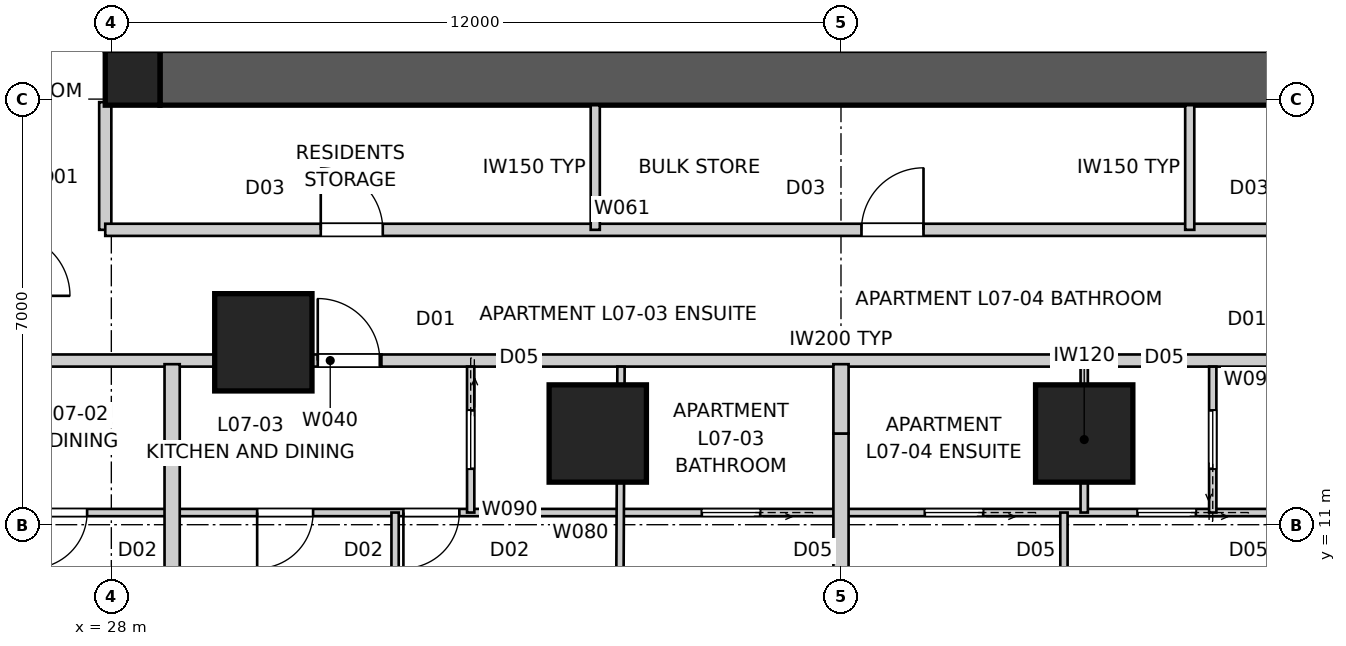
"""IFC4 building model, lengths in metres.
Left out: names, types, materials, properties, quantities, classifications, styles, units other than length and angle.
Written with IfcOpenShell. Run it as: python <this file> out.ifc"""

import sys

from ifc_helpers import new_model, si_unit, direction, frame, frame_2d, origin, origin_2d, place, context, subcontext, project, spatial, polyline, rectangle, outline, extrude, element, fill, save


model = new_model("IFC4")
c1 = context("Model", 3, precision=1e-05, world=origin(), true_north=direction((0.0, 1.0)))
c2 = subcontext(c1, "Body", "Model", "MODEL_VIEW")
j1 = project(units=[si_unit("LENGTHUNIT", "METRE"), si_unit("PLANEANGLEUNIT", "RADIAN")], contexts=[c1])
p1 = place(None, origin())
s1 = spatial("IfcSite", under=j1, at=p1, CompositionType="ELEMENT")
p2 = place(p1, origin())
s2 = spatial("IfcBuilding", under=s1, at=p2, CompositionType="ELEMENT")
p3 = place(p2, frame((0.0, 0.0, 28.6)))
s3 = spatial("IfcBuildingStorey", under=s2, at=p3, CompositionType="ELEMENT", Elevation=28.6)
p4 = place(p3, frame((51.2, 18.35, 0.0), z_axis=(0.0, 0.0, 1.0), x_axis=(-1.0, 0.0, 0.0)))
e1 = element("IfcWall", 1, at=p4, inside=s3, PredefinedType="SHEAR", context=c2, shape_type="SweptSolid", body=[
    extrude(outline(polyline([(0.0, -0.45), (22.4, -0.45), (22.4, -0.025), (22.85, -0.025), (22.85, 0.025), (22.4, 0.025), (22.4, 0.45), (0.0, 0.45), (0.0, 0.025), (-0.45, 0.025), (-0.45, -0.025), (0.0, -0.025), (0.0, -0.45)])), origin(), (0.0, 0.0, 1.0), 3.4),
])
p5 = place(p3, frame((28.35, 41.2, 0.0), z_axis=(0.0, 0.0, 1.0), x_axis=(0.0, -1.0, 0.0)))
e2 = element("IfcWall", 2, at=p5, inside=s3, PredefinedType="SHEAR", context=c2, shape_type="SweptSolid", body=[
    extrude(outline(polyline([(0.0, -0.45), (22.4, -0.45), (22.4, -0.025), (22.85, -0.025), (22.85, 0.025), (22.4, 0.025), (22.4, 0.45), (0.0, 0.45), (0.0, 0.025), (-0.45, 0.025), (-0.45, -0.025), (0.0, -0.025), (0.0, -0.45)])), origin(), (0.0, 0.0, 1.0), 3.4),
])
p6 = place(p5, frame((11.14, 0.0, 0.0)))
e3 = element("IfcOpeningElement", 3, at=p6, cuts=e2, PredefinedType="OPENING", context=c2, shape_type="SweptSolid", body=[
    extrude(rectangle(XDim=1.02, YDim=2.4, at=frame_2d((0.51, 1.2))), frame((0.0, 0.46, 0.0), z_axis=(0.0, -1.0, 0.0), x_axis=(1.0, 0.0, 0.0)), (0.0, 0.0, 1.0), 0.92),
])
p7 = place(p3, frame((28.35, 18.35, 0.0), z_axis=(0.0, 0.0, 1.0), x_axis=(1.0, 0.0, 0.0)))
e4 = element("IfcColumn", 4, at=p7, inside=s3, PredefinedType="COLUMN", context=c2, shape_type="SweptSolid", body=[
    extrude(rectangle(XDim=0.9, YDim=0.9, at=origin_2d()), origin(), (0.0, 0.0, 1.0), 3.4),
])
for number, where, z_axis, x_axis in (
    (5, (30.5, 14.0, 0.0), (0.0, 0.0, 1.0), (1.0, 0.0, 0.0)),
    (6, (36.0, 12.5, 0.0), (0.0, 0.0, 1.0), (1.0, 0.0, 0.0)),
    (7, (44.0, 12.5, 0.0), (0.0, 0.0, 1.0), (1.0, 0.0, 0.0)),
):
    element("IfcColumn", number, at=place(p3, frame(where, z_axis=z_axis, x_axis=x_axis)), inside=s3, PredefinedType="COLUMN", context=c2, shape_type="SweptSolid", body=[
        extrude(rectangle(XDim=1.6, YDim=1.6, at=origin_2d()), origin(), (0.0, 0.0, 1.0), 3.4),
    ])
p8 = place(p3, frame((26.3, 13.7, 0.0), z_axis=(0.0, 0.0, 1.0), x_axis=(1.0, 0.0, 0.0)))
e8 = element("IfcWall", 8, at=p8, inside=s3, PredefinedType="PARTITIONING", context=c2, shape_type="SweptSolid", body=[
    extrude(rectangle(XDim=4.458, YDim=0.2, at=frame_2d((2.229, 0.0))), origin(), (0.0, 0.0, 1.0), 3.25),
])
p9 = place(p3, frame((30.758, 13.7, 0.0), z_axis=(0.0, 0.0, 1.0), x_axis=(1.0, 0.0, 0.0)))
e9 = element("IfcWall", 9, at=p9, inside=s3, PredefinedType="PARTITIONING", context=c2, shape_type="SweptSolid", body=[
    extrude(rectangle(XDim=1.683, YDim=0.2, at=frame_2d((0.842, 0.0))), origin(), (0.0, 0.0, 1.0), 2.55),
])
p10 = place(p9, frame((0.637, 0.0, 0.0)))
e10 = element("IfcOpeningElement", 10, at=p10, cuts=e9, PredefinedType="OPENING", context=c2, shape_type="SweptSolid", body=[
    extrude(rectangle(XDim=1.02, YDim=2.34, at=frame_2d((0.51, 1.17))), frame((0.0, 0.11, 0.0), z_axis=(0.0, -1.0, 0.0), x_axis=(1.0, 0.0, 0.0)), (0.0, 0.0, 1.0), 0.22),
])
p11 = place(p3, frame((32.442, 13.7, 0.0), z_axis=(0.0, 0.0, 1.0), x_axis=(1.0, 0.0, 0.0)))
e11 = element("IfcWall", 11, at=p11, inside=s3, PredefinedType="PARTITIONING", context=c2, shape_type="SweptSolid", body=[
    extrude(rectangle(XDim=15.117, YDim=0.2, at=frame_2d((7.558, 0.0))), origin(), (0.0, 0.0, 1.0), 3.25),
])
p12 = place(p3, frame((29.0, 4.0, 0.0), z_axis=(0.0, 0.0, 1.0), x_axis=(0.0, 1.0, 0.0)))
e12 = element("IfcWall", 12, at=p12, inside=s3, PredefinedType="PARTITIONING", context=c2, shape_type="SweptSolid", body=[
    extrude(rectangle(XDim=9.64, YDim=0.25, at=frame_2d((4.82, 0.0))), origin(), (0.0, 0.0, 1.0), 3.25),
])
p13 = place(p3, frame((40.0, 4.0, 0.0), z_axis=(0.0, 0.0, 1.0), x_axis=(0.0, 1.0, 0.0)))
e13 = element("IfcWall", 13, at=p13, inside=s3, PredefinedType="PARTITIONING", context=c2, shape_type="SweptSolid", body=[
    extrude(rectangle(XDim=8.5, YDim=0.25, at=frame_2d((4.25, 0.0))), origin(), (0.0, 0.0, 1.0), 3.25),
])
p14 = place(p3, frame((40.0, 12.5, 0.0), z_axis=(0.0, 0.0, 1.0), x_axis=(0.0, 1.0, 0.0)))
e14 = element("IfcWall", 14, at=p14, inside=s3, PredefinedType="PARTITIONING", context=c2, shape_type="SweptSolid", body=[
    extrude(rectangle(XDim=1.14, YDim=0.25, at=frame_2d((0.57, 0.0))), origin(), (0.0, 0.0, 1.0), 2.796),
])
p15 = place(p3, frame((27.9, 17.95, 0.0), z_axis=(0.0, 0.0, 1.0), x_axis=(0.0, -1.0, 0.0)))
e15 = element("IfcWall", 15, at=p15, inside=s3, PredefinedType="PARTITIONING", context=c2, shape_type="SweptSolid", body=[
    extrude(rectangle(XDim=2.1, YDim=0.2, at=frame_2d((1.05, 0.0))), origin(), (0.0, 0.0, 1.0), 3.25),
])
p16 = place(p3, frame((27.9, 15.85, 0.0), z_axis=(0.0, 0.0, 1.0), x_axis=(1.0, 0.0, 0.0)))
e16 = element("IfcWall", 16, at=p16, inside=s3, PredefinedType="PARTITIONING", context=c2, shape_type="SweptSolid", body=[
    extrude(rectangle(XDim=24.2, YDim=0.2, at=frame_2d((12.1, 0.0))), origin(), (0.0, 0.0, 1.0), 3.25),
])
p17 = place(p16, frame((12.437, 0.0, 0.0)))
e17 = element("IfcOpeningElement", 17, at=p17, cuts=e16, PredefinedType="OPENING", context=c2, shape_type="SweptSolid", body=[
    extrude(rectangle(XDim=1.02, YDim=2.1, at=frame_2d((0.51, 1.05))), frame((0.0, 0.11, 0.0), z_axis=(0.0, -1.0, 0.0), x_axis=(1.0, 0.0, 0.0)), (0.0, 0.0, 1.0), 0.22),
])
p18 = place(p16, frame((3.544, 0.0, 0.0)))
e18 = element("IfcOpeningElement", 18, at=p18, cuts=e16, PredefinedType="OPENING", context=c2, shape_type="SweptSolid", body=[
    extrude(rectangle(XDim=1.02, YDim=2.1, at=frame_2d((0.51, 1.05))), frame((0.0, 0.11, 0.0), z_axis=(0.0, -1.0, 0.0), x_axis=(1.0, 0.0, 0.0)), (0.0, 0.0, 1.0), 0.22),
])
p19 = place(p16, frame((19.733, 0.0, 0.0)))
e19 = element("IfcOpeningElement", 19, at=p19, cuts=e16, PredefinedType="OPENING", context=c2, shape_type="SweptSolid", body=[
    extrude(rectangle(XDim=1.02, YDim=2.1, at=frame_2d((0.51, 1.05))), frame((0.0, 0.11, 0.0), z_axis=(0.0, -1.0, 0.0), x_axis=(1.0, 0.0, 0.0)), (0.0, 0.0, 1.0), 0.22),
])
p20 = place(p3, frame((35.958, 15.85, 0.0), z_axis=(0.0, 0.0, 1.0), x_axis=(0.0, 1.0, 0.0)))
e20 = element("IfcWall", 20, at=p20, inside=s3, PredefinedType="SOLIDWALL", context=c2, shape_type="SweptSolid", body=[
    extrude(rectangle(XDim=2.05, YDim=0.15, at=frame_2d((1.025, 0.0))), origin(), (0.0, 0.0, 1.0), 3.25),
])
p21 = place(p3, frame((45.735, 15.85, 0.0), z_axis=(0.0, 0.0, 1.0), x_axis=(0.0, 1.0, 0.0)))
e21 = element("IfcWall", 21, at=p21, inside=s3, PredefinedType="SOLIDWALL", context=c2, shape_type="SweptSolid", body=[
    extrude(rectangle(XDim=2.05, YDim=0.15, at=frame_2d((1.025, 0.0))), origin(), (0.0, 0.0, 1.0), 2.796),
])
p22 = place(p3, frame((56.2, 11.2, 0.0), z_axis=(0.0, 0.0, 1.0), x_axis=(-1.0, 0.0, 0.0)))
e22 = element("IfcWall", 22, at=p22, inside=s3, PredefinedType="PARTITIONING", context=c2, shape_type="SweptSolid", body=[
    extrude(rectangle(XDim=32.4, YDim=0.12, at=frame_2d((16.2, 0.0))), origin(), (0.0, 0.0, 1.0), 3.25),
])
p23 = place(p22, frame((24.882, 0.0, 0.0)))
e23 = element("IfcOpeningElement", 23, at=p23, cuts=e22, PredefinedType="OPENING", context=c2, shape_type="SweptSolid", body=[
    extrude(rectangle(XDim=0.92, YDim=2.34, at=frame_2d((0.46, 1.17))), frame((0.0, 0.07, 0.0), z_axis=(0.0, -1.0, 0.0), x_axis=(1.0, 0.0, 0.0)), (0.0, 0.0, 1.0), 0.14),
])
p24 = place(p22, frame((22.477, 0.0, 0.0)))
e24 = element("IfcOpeningElement", 24, at=p24, cuts=e22, PredefinedType="OPENING", context=c2, shape_type="SweptSolid", body=[
    extrude(rectangle(XDim=0.92, YDim=2.34, at=frame_2d((0.46, 1.17))), frame((0.0, 0.07, 0.0), z_axis=(0.0, -1.0, 0.0), x_axis=(1.0, 0.0, 0.0)), (0.0, 0.0, 1.0), 0.14),
])
p25 = place(p22, frame((6.598, 0.0, 0.0)))
e25 = element("IfcOpeningElement", 25, at=p25, cuts=e22, PredefinedType="OPENING", context=c2, shape_type="SweptSolid", body=[
    extrude(rectangle(XDim=0.92, YDim=2.34, at=frame_2d((0.46, 1.17))), frame((0.0, 0.07, 0.0), z_axis=(0.0, -1.0, 0.0), x_axis=(1.0, 0.0, 0.0)), (0.0, 0.0, 1.0), 0.14),
])
p26 = place(p22, frame((28.598, 0.0, 0.0)))
e26 = element("IfcOpeningElement", 26, at=p26, cuts=e22, PredefinedType="OPENING", context=c2, shape_type="SweptSolid", body=[
    extrude(rectangle(XDim=0.92, YDim=2.34, at=frame_2d((0.46, 1.17))), frame((0.0, 0.07, 0.0), z_axis=(0.0, -1.0, 0.0), x_axis=(1.0, 0.0, 0.0)), (0.0, 0.0, 1.0), 0.14),
])
p27 = place(p22, frame((2.862, 0.0, 0.0)))
e27 = element("IfcOpeningElement", 27, at=p27, cuts=e22, PredefinedType="OPENING", context=c2, shape_type="SweptSolid", body=[
    extrude(rectangle(XDim=0.96, YDim=2.1, at=frame_2d((0.48, 1.05))), frame((0.0, 0.07, 0.0), z_axis=(0.0, -1.0, 0.0), x_axis=(1.0, 0.0, 0.0)), (0.0, 0.0, 1.0), 0.14),
])
p28 = place(p22, frame((10.363, 0.0, 0.0)))
e28 = element("IfcOpeningElement", 28, at=p28, cuts=e22, PredefinedType="OPENING", context=c2, shape_type="SweptSolid", body=[
    extrude(rectangle(XDim=0.96, YDim=2.1, at=frame_2d((0.48, 1.05))), frame((0.0, 0.07, 0.0), z_axis=(0.0, -1.0, 0.0), x_axis=(1.0, 0.0, 0.0)), (0.0, 0.0, 1.0), 0.14),
])
p29 = place(p22, frame((13.862, 0.0, 0.0)))
e29 = element("IfcOpeningElement", 29, at=p29, cuts=e22, PredefinedType="OPENING", context=c2, shape_type="SweptSolid", body=[
    extrude(rectangle(XDim=0.96, YDim=2.1, at=frame_2d((0.48, 1.05))), frame((0.0, 0.07, 0.0), z_axis=(0.0, -1.0, 0.0), x_axis=(1.0, 0.0, 0.0)), (0.0, 0.0, 1.0), 0.14),
])
p30 = place(p22, frame((17.529, 0.0, 0.0)))
e30 = element("IfcOpeningElement", 30, at=p30, cuts=e22, PredefinedType="OPENING", context=c2, shape_type="SweptSolid", body=[
    extrude(rectangle(XDim=0.96, YDim=2.1, at=frame_2d((0.48, 1.05))), frame((0.0, 0.07, 0.0), z_axis=(0.0, -1.0, 0.0), x_axis=(1.0, 0.0, 0.0)), (0.0, 0.0, 1.0), 0.14),
])
p31 = place(p3, frame((33.91, 13.6, 0.0), z_axis=(0.0, 0.0, 1.0), x_axis=(0.0, -1.0, 0.0)))
e31 = element("IfcWall", 31, at=p31, inside=s3, PredefinedType="PARTITIONING", context=c2, shape_type="SweptSolid", body=[
    extrude(rectangle(XDim=2.4, YDim=0.12, at=frame_2d((1.2, 0.0))), origin(), (0.0, 0.0, 1.0), 3.25),
])
p32 = place(p31, frame((0.72, 0.0, 0.0)))
e32 = element("IfcOpeningElement", 32, at=p32, cuts=e31, PredefinedType="OPENING", context=c2, shape_type="SweptSolid", body=[
    extrude(rectangle(XDim=0.96, YDim=2.1, at=frame_2d((0.48, 1.05))), frame((0.0, 0.07, 0.0), z_axis=(0.0, -1.0, 0.0), x_axis=(1.0, 0.0, 0.0)), (0.0, 0.0, 1.0), 0.14),
])
p33 = place(p3, frame((36.333, 4.04, 0.0), z_axis=(0.0, 0.0, 1.0), x_axis=(0.005107446534, 0.99998695691, 0.0)))
e33 = element("IfcWall", 33, at=p33, inside=s3, PredefinedType="PARTITIONING", context=c2, shape_type="SweptSolid", body=[
    extrude(rectangle(XDim=9.56, YDim=0.12, at=frame_2d((4.78, 0.0))), origin(), (0.0, 0.0, 1.0), 3.25),
])
p34 = place(p33, frame((3.1, 0.0, 0.0)))
e34 = element("IfcOpeningElement", 34, at=p34, cuts=e33, PredefinedType="OPENING", context=c2, shape_type="SweptSolid", body=[
    extrude(rectangle(XDim=0.92, YDim=2.34, at=frame_2d((0.46, 1.17))), frame((0.0, 0.07, 0.0), z_axis=(0.0, -1.0, 0.0), x_axis=(1.0, 0.0, 0.0)), (0.0, 0.0, 1.0), 0.14),
])
p35 = place(p3, frame((32.667, 11.2, 0.0), z_axis=(0.0, 0.0, 1.0), x_axis=(0.0, -1.0, 0.0)))
e35 = element("IfcWall", 35, at=p35, inside=s3, PredefinedType="PARTITIONING", context=c2, shape_type="SweptSolid", body=[
    extrude(rectangle(XDim=7.16, YDim=0.12, at=frame_2d((3.58, 0.0))), origin(), (0.0, 0.0, 1.0), 3.25),
])
p36 = place(p3, frame((46.114, 11.2, 0.0), z_axis=(0.0, 0.0, 1.0), x_axis=(0.0, 1.0, 0.0)))
e36 = element("IfcWall", 36, at=p36, inside=s3, PredefinedType="PARTITIONING", context=c2, shape_type="SweptSolid", body=[
    extrude(rectangle(XDim=2.4, YDim=0.12, at=frame_2d((1.2, 0.0))), origin(), (0.0, 0.0, 1.0), 3.25),
])
p37 = place(p36, frame((0.72, 0.0, 0.0)))
e37 = element("IfcOpeningElement", 37, at=p37, cuts=e36, PredefinedType="OPENING", context=c2, shape_type="SweptSolid", body=[
    extrude(rectangle(XDim=0.96, YDim=2.1, at=frame_2d((0.48, 1.05))), frame((0.0, 0.07, 0.0), z_axis=(0.0, -1.0, 0.0), x_axis=(1.0, 0.0, 0.0)), (0.0, 0.0, 1.0), 0.14),
])
p38 = place(p3, frame((44.0, 11.2, 0.0), z_axis=(0.0, 0.0, 1.0), x_axis=(0.0, 1.0, 0.0)))
e38 = element("IfcWall", 38, at=p38, inside=s3, PredefinedType="PARTITIONING", context=c2, shape_type="SweptSolid", body=[
    extrude(rectangle(XDim=2.4, YDim=0.12, at=frame_2d((1.2, 0.0))), origin(), (0.0, 0.0, 1.0), 3.25),
])
p39 = place(p3, frame((43.667, 11.2, 0.0), z_axis=(0.0, 0.0, 1.0), x_axis=(0.0, -1.0, 0.0)))
e39 = element("IfcWall", 39, at=p39, inside=s3, PredefinedType="PARTITIONING", context=c2, shape_type="SweptSolid", body=[
    extrude(rectangle(XDim=7.16, YDim=0.12, at=frame_2d((3.58, 0.0))), origin(), (0.0, 0.0, 1.0), 3.25),
])
p40 = place(p39, frame((3.14, 0.0, 0.0)))
e40 = element("IfcOpeningElement", 40, at=p40, cuts=e39, PredefinedType="OPENING", context=c2, shape_type="SweptSolid", body=[
    extrude(rectangle(XDim=0.92, YDim=2.34, at=frame_2d((0.46, 1.17))), frame((0.0, 0.07, 0.0), z_axis=(0.0, -1.0, 0.0), x_axis=(1.0, 0.0, 0.0)), (0.0, 0.0, 1.0), 0.14),
])
p41 = place(p17, origin())
e41 = element("IfcDoor", 41, at=p41, inside=s3, OperationType="SINGLE_SWING_RIGHT", PredefinedType="DOOR", context=c2, shape_type="SweptSolid", body=[
    extrude(rectangle(XDim=1.02, YDim=2.1, at=frame_2d((0.51, 1.05))), frame((0.0, 0.025, 0.0), z_axis=(0.0, -1.0, 0.0), x_axis=(1.0, 0.0, 0.0)), (0.0, 0.0, 1.0), 0.05),
])
fill(e17, e41)
p42 = place(p18, origin())
e42 = element("IfcDoor", 42, at=p42, inside=s3, OperationType="SINGLE_SWING_LEFT", PredefinedType="DOOR", context=c2, shape_type="SweptSolid", body=[
    extrude(rectangle(XDim=1.02, YDim=2.1, at=frame_2d((0.51, 1.05))), frame((0.0, 0.025, 0.0), z_axis=(0.0, -1.0, 0.0), x_axis=(1.0, 0.0, 0.0)), (0.0, 0.0, 1.0), 0.05),
])
fill(e18, e42)
p43 = place(p10, origin())
e43 = element("IfcDoor", 43, at=p43, inside=s3, OperationType="SINGLE_SWING_LEFT", PredefinedType="DOOR", context=c2, shape_type="SweptSolid", body=[
    extrude(rectangle(XDim=1.02, YDim=2.34, at=frame_2d((0.51, 1.17))), frame((0.0, 0.025, 0.0), z_axis=(0.0, -1.0, 0.0), x_axis=(1.0, 0.0, 0.0)), (0.0, 0.0, 1.0), 0.05),
])
fill(e10, e43)
p44 = place(p23, origin())
e44 = element("IfcDoor", 44, at=p44, inside=s3, OperationType="SINGLE_SWING_RIGHT", PredefinedType="DOOR", context=c2, shape_type="SweptSolid", body=[
    extrude(rectangle(XDim=0.92, YDim=2.34, at=frame_2d((0.46, 1.17))), frame((0.0, 0.025, 0.0), z_axis=(0.0, -1.0, 0.0), x_axis=(1.0, 0.0, 0.0)), (0.0, 0.0, 1.0), 0.05),
])
fill(e23, e44)
p45 = place(p32, origin())
e45 = element("IfcDoor", 45, at=p45, inside=s3, OperationType="SLIDING_TO_LEFT", PredefinedType="DOOR", context=c2, shape_type="SweptSolid", body=[
    extrude(rectangle(XDim=0.96, YDim=2.1, at=frame_2d((0.48, 1.05))), frame((0.0, 0.025, 0.0), z_axis=(0.0, -1.0, 0.0), x_axis=(1.0, 0.0, 0.0)), (0.0, 0.0, 1.0), 0.05),
])
fill(e32, e45)
p46 = place(p24, origin())
e46 = element("IfcDoor", 46, at=p46, inside=s3, OperationType="SINGLE_SWING_RIGHT", PredefinedType="DOOR", context=c2, shape_type="SweptSolid", body=[
    extrude(rectangle(XDim=0.92, YDim=2.34, at=frame_2d((0.46, 1.17))), frame((0.0, 0.025, 0.0), z_axis=(0.0, -1.0, 0.0), x_axis=(1.0, 0.0, 0.0)), (0.0, 0.0, 1.0), 0.05),
])
fill(e24, e46)
p47 = place(p37, origin())
e47 = element("IfcDoor", 47, at=p47, inside=s3, OperationType="SLIDING_TO_LEFT", PredefinedType="DOOR", context=c2, shape_type="SweptSolid", body=[
    extrude(rectangle(XDim=0.96, YDim=2.1, at=frame_2d((0.48, 1.05))), frame((0.0, 0.025, 0.0), z_axis=(0.0, -1.0, 0.0), x_axis=(1.0, 0.0, 0.0)), (0.0, 0.0, 1.0), 0.05),
])
fill(e37, e47)
p48 = place(p26, origin())
e48 = element("IfcDoor", 48, at=p48, inside=s3, OperationType="SINGLE_SWING_RIGHT", PredefinedType="DOOR", context=c2, shape_type="SweptSolid", body=[
    extrude(rectangle(XDim=0.92, YDim=2.34, at=frame_2d((0.46, 1.17))), frame((0.0, 0.025, 0.0), z_axis=(0.0, -1.0, 0.0), x_axis=(1.0, 0.0, 0.0)), (0.0, 0.0, 1.0), 0.05),
])
fill(e26, e48)
p49 = place(p28, origin())
e49 = element("IfcDoor", 49, at=p49, inside=s3, OperationType="SLIDING_TO_LEFT", PredefinedType="DOOR", context=c2, shape_type="SweptSolid", body=[
    extrude(rectangle(XDim=0.96, YDim=2.1, at=frame_2d((0.48, 1.05))), frame((0.0, 0.025, 0.0), z_axis=(0.0, -1.0, 0.0), x_axis=(1.0, 0.0, 0.0)), (0.0, 0.0, 1.0), 0.05),
])
fill(e28, e49)
p50 = place(p29, origin())
e50 = element("IfcDoor", 50, at=p50, inside=s3, OperationType="SLIDING_TO_LEFT", PredefinedType="DOOR", context=c2, shape_type="SweptSolid", body=[
    extrude(rectangle(XDim=0.96, YDim=2.1, at=frame_2d((0.48, 1.05))), frame((0.0, 0.025, 0.0), z_axis=(0.0, -1.0, 0.0), x_axis=(1.0, 0.0, 0.0)), (0.0, 0.0, 1.0), 0.05),
])
fill(e29, e50)
p51 = place(p30, origin())
e51 = element("IfcDoor", 51, at=p51, inside=s3, OperationType="SLIDING_TO_LEFT", PredefinedType="DOOR", context=c2, shape_type="SweptSolid", body=[
    extrude(rectangle(XDim=0.96, YDim=2.1, at=frame_2d((0.48, 1.05))), frame((0.0, 0.025, 0.0), z_axis=(0.0, -1.0, 0.0), x_axis=(1.0, 0.0, 0.0)), (0.0, 0.0, 1.0), 0.05),
])
fill(e30, e51)
save(model, sys.argv[1])
